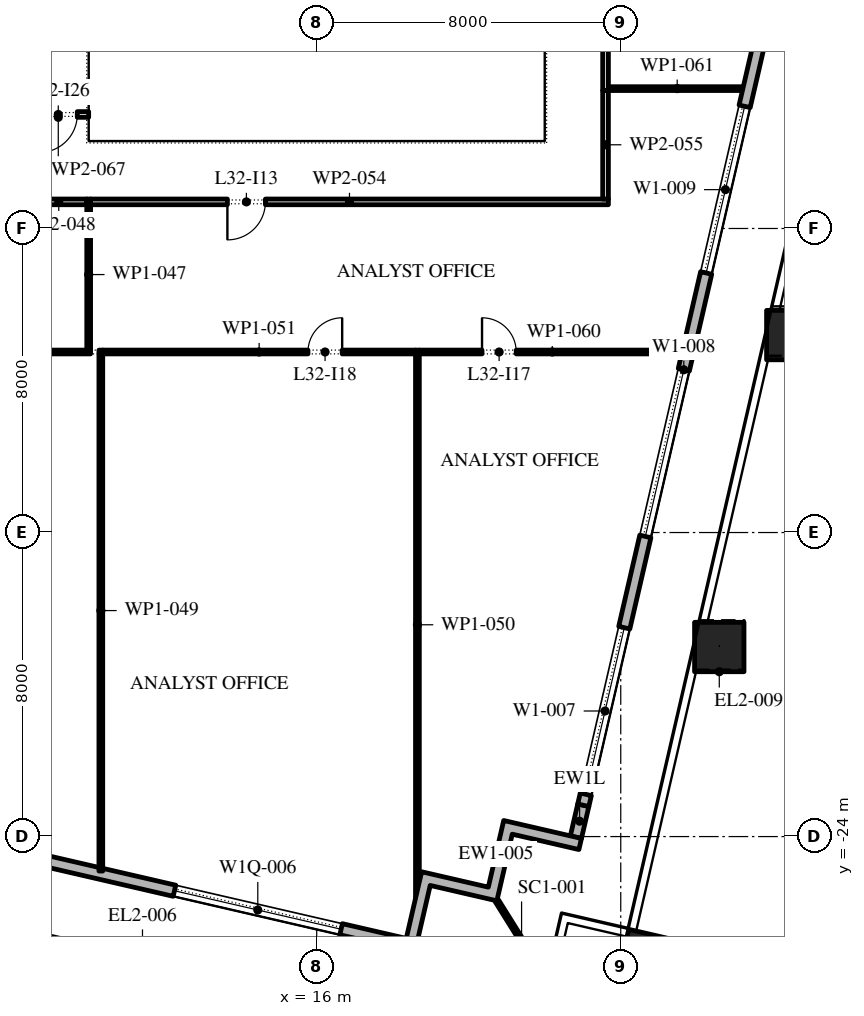
"""IFC4 building model, lengths in metres.
Left out: names, types, materials, properties, quantities, classifications, styles, units other than length and angle.
Written with IfcOpenShell. Run it as: python <this file> out.ifc"""

import sys

from ifc_helpers import new_model, si_unit, direction, frame, frame_2d, origin, origin_2d, place, context, subcontext, project, spatial, polyline, rectangle, outline, extrude, element, fill, save


model = new_model("IFC4")
c1 = context("Model", 3, precision=1e-05, world=origin(), true_north=direction((0.0, 1.0)))
c2 = subcontext(c1, "Body", "Model", "MODEL_VIEW")
j1 = project(units=[si_unit("LENGTHUNIT", "METRE"), si_unit("PLANEANGLEUNIT", "RADIAN")], contexts=[c1])
p1 = place(None, origin())
s1 = spatial("IfcSite", under=j1, at=p1, CompositionType="ELEMENT")
p2 = place(p1, origin())
s2 = spatial("IfcBuilding", under=s1, at=p2, CompositionType="ELEMENT")
p3 = place(p2, frame((0.0, 0.0, 147.6)))
s3 = spatial("IfcBuildingStorey", under=s2, at=p3, CompositionType="ELEMENT", Elevation=147.6)
p4 = place(p3, frame((24.698, -27.22, 0.0), z_axis=(0.0, 0.0, 1.0), x_axis=(0.974370064785, -0.224951054344, 0.0)))
e1 = element("IfcColumn", 1, at=p4, inside=s3, PredefinedType="COLUMN", context=c2, shape_type="SweptSolid", body=[
    extrude(rectangle(XDim=1.3, YDim=1.3, at=origin_2d()), origin(), (0.0, 0.0, 1.0), 4.2),
])
p5 = place(p3, frame((26.593, -19.012, 0.0), z_axis=(0.002906226325, 0.012613022249, 0.99991622925), x_axis=(-0.974466825284, 0.224531526563, 0.0)))
e2 = element("IfcColumn", 2, at=p5, inside=s3, PredefinedType="COLUMN", context=c2, shape_type="SweptSolid", body=[
    extrude(rectangle(XDim=1.3, YDim=1.3, at=origin_2d()), origin(), (0.0, 0.0, 1.0), 4.2),
])
p6 = place(p3, frame((28.487, -10.805, 0.0), z_axis=(0.005869091843, 0.025277771797, 0.999663237302), x_axis=(-0.974088391429, 0.226167649504, 0.0)))
e3 = element("IfcColumn", 3, at=p6, inside=s3, PredefinedType="COLUMN", context=c2, shape_type="SweptSolid", body=[
    extrude(rectangle(XDim=1.3, YDim=1.3, at=origin_2d()), origin(), (0.0, 0.0, 1.0), 4.201),
])
p7 = place(p3, frame((-31.078, -15.421, 0.0), z_axis=(0.0, 0.0, 1.0), x_axis=(0.974370456532, -0.224949357493, 0.0)))
e4 = element("IfcWall", 4, at=p7, inside=s3, PredefinedType="STANDARD", context=c2, shape_type="SweptSolid", body=[
    extrude(rectangle(XDim=51.0, YDim=0.3, at=frame_2d((25.5, 0.0))), origin(), (0.0, 0.0, 1.0), 4.0),
])
p8 = place(p7, frame((1.875, 0.0, 0.45)))
e5 = element("IfcOpeningElement", 5, at=p8, cuts=e4, PredefinedType="OPENING", context=c2, shape_type="SweptSolid", body=[
    extrude(rectangle(XDim=4.5, YDim=2.65, at=frame_2d((2.25, 1.325))), frame((0.0, 0.16, 0.0), z_axis=(0.0, -1.0, 0.0), x_axis=(1.0, 0.0, 0.0)), (0.0, 0.0, 1.0), 0.32),
])
p9 = place(p7, frame((10.275, 0.0, 0.45)))
e6 = element("IfcOpeningElement", 6, at=p9, cuts=e4, PredefinedType="OPENING", context=c2, shape_type="SweptSolid", body=[
    extrude(rectangle(XDim=4.5, YDim=2.525, at=frame_2d((2.25, 1.262))), frame((0.0, 0.16, 0.0), z_axis=(0.0, -1.0, 0.0), x_axis=(1.0, 0.0, 0.0)), (0.0, 0.0, 1.0), 0.32),
])
p10 = place(p7, frame((18.825, 0.0, 0.45)))
e7 = element("IfcOpeningElement", 7, at=p10, cuts=e4, PredefinedType="OPENING", context=c2, shape_type="SweptSolid", body=[
    extrude(rectangle(XDim=4.5, YDim=2.5, at=frame_2d((2.25, 1.25))), frame((0.0, 0.16, 0.0), z_axis=(0.0, -1.0, 0.0), x_axis=(1.0, 0.0, 0.0)), (0.0, 0.0, 1.0), 0.32),
])
p11 = place(p7, frame((27.075, 0.0, 0.0)))
e8 = element("IfcOpeningElement", 8, at=p11, cuts=e4, PredefinedType="OPENING", context=c2, shape_type="SweptSolid", body=[
    extrude(rectangle(XDim=2.4, YDim=3.5, at=frame_2d((1.2, 1.75))), frame((0.0, 0.16, 0.0), z_axis=(0.0, -1.0, 0.0), x_axis=(1.0, 0.0, 0.0)), (0.0, 0.0, 1.0), 0.32),
])
p12 = place(p7, frame((35.925, 0.0, 0.45)))
e9 = element("IfcOpeningElement", 9, at=p12, cuts=e4, PredefinedType="OPENING", context=c2, shape_type="SweptSolid", body=[
    extrude(rectangle(XDim=4.5, YDim=2.45, at=frame_2d((2.25, 1.225))), frame((0.0, 0.16, 0.0), z_axis=(0.0, -1.0, 0.0), x_axis=(1.0, 0.0, 0.0)), (0.0, 0.0, 1.0), 0.32),
])
p13 = place(p7, frame((44.475, 0.0, 0.45)))
e10 = element("IfcOpeningElement", 10, at=p13, cuts=e4, PredefinedType="OPENING", context=c2, shape_type="SweptSolid", body=[
    extrude(rectangle(XDim=4.5, YDim=2.45, at=frame_2d((2.25, 1.225))), frame((0.0, 0.16, 0.0), z_axis=(0.0, -1.0, 0.0), x_axis=(1.0, 0.0, 0.0)), (0.0, 0.0, 1.0), 0.32),
])
p14 = place(p3, frame((22.82, -24.016, 0.0), z_axis=(0.0, 0.0, 1.0), x_axis=(0.225107657095, 0.974333896935, 0.0)))
e11 = element("IfcWall", 11, at=p14, inside=s3, PredefinedType="STANDARD", context=c2, shape_type="SweptSolid", body=[
    extrude(rectangle(XDim=0.862, YDim=0.3, at=frame_2d((0.431, 0.0))), origin(), (0.0, 0.0, 1.0), 3.02),
])
p15 = place(p3, origin())
e12 = element("IfcWall", 12, at=p15, inside=s3, PredefinedType="STANDARD", context=c2, shape_type="SweptSolid", body=[
    extrude(outline(polyline([(20.515, -25.331), (20.92, -23.577), (22.967, -24.049), (22.899, -24.342), (21.145, -23.937), (20.74, -25.691), (18.986, -25.286), (18.649, -26.747), (18.357, -26.68), (18.762, -24.926), (20.515, -25.331)])), origin(), (0.0, 0.0, 1.0), 4.0),
])
p16 = place(p3, frame((20.74, -25.691, -0.05), z_axis=(0.0, 0.0, 1.0), x_axis=(0.529972121605, -0.848015064914, 0.0)))
e13 = element("IfcWall", 13, at=p16, inside=s3, PredefinedType="STANDARD", context=c2, shape_type="SweptSolid", body=[
    extrude(rectangle(XDim=2.455, YDim=0.1, at=frame_2d((1.228, 0.0))), origin(), (0.0, 0.0, 1.0), 4.05),
])
p17 = place(p3, frame((10.05, -11.25, 0.0), z_axis=(0.0, 0.0, 1.0), x_axis=(-1.0, 0.0, 0.0)))
e14 = element("IfcWall", 14, at=p17, inside=s3, PredefinedType="PARTITIONING", context=c2, shape_type="SweptSolid", body=[
    extrude(rectangle(XDim=11.99, YDim=0.1, at=frame_2d((5.995, 0.0))), origin(), (0.0, 0.0, 1.0), 4.0),
])
p18 = place(p17, frame((4.44, 0.0, 0.0)))
e15 = element("IfcOpeningElement", 15, at=p18, cuts=e14, PredefinedType="OPENING", context=c2, shape_type="SweptSolid", body=[
    extrude(rectangle(XDim=0.9, YDim=2.1, at=frame_2d((0.45, 1.05))), frame((0.0, 0.06, 0.0), z_axis=(0.0, -1.0, 0.0), x_axis=(1.0, 0.0, 0.0)), (0.0, 0.0, 1.0), 0.12),
])
p19 = place(p3, frame((10.0, -11.2, 0.0), z_axis=(0.0, 0.0, 1.0), x_axis=(0.0, 1.0, 0.0)))
e16 = element("IfcWall", 16, at=p19, inside=s3, PredefinedType="PARTITIONING", context=c2, shape_type="SweptSolid", body=[
    extrude(rectangle(XDim=3.975, YDim=0.1, at=frame_2d((1.987, 0.0))), origin(), (0.0, 0.0, 1.0), 4.0),
])
p20 = place(p3, frame((9.95, -7.3, 0.0), z_axis=(0.0, 0.0, 1.0), x_axis=(-1.0, 0.0, 0.0)))
e17 = element("IfcWall", 17, at=p20, inside=s3, PredefinedType="PARTITIONING", context=c2, shape_type="SweptSolid", body=[
    extrude(rectangle(XDim=1.475, YDim=0.15, at=frame_2d((0.737, 0.0))), origin(), (0.0, 0.0, 1.0), 4.0),
])
p21 = place(p3, frame((10.32, -24.907, 0.0), z_axis=(0.0, 0.0, 1.0), x_axis=(0.0, 1.0, 0.0)))
e18 = element("IfcWall", 18, at=p21, inside=s3, PredefinedType="PARTITIONING", context=c2, shape_type="SweptSolid", body=[
    extrude(rectangle(XDim=13.707, YDim=0.1, at=frame_2d((6.854, 0.0))), origin(), (0.0, 0.0, 1.0), 4.0),
])
p22 = place(p3, frame((18.65, -25.654, 0.0), z_axis=(0.0, 0.0, 1.0), x_axis=(0.0, 1.0, 0.0)))
e19 = element("IfcWall", 19, at=p22, inside=s3, PredefinedType="PARTITIONING", context=c2, shape_type="SweptSolid", body=[
    extrude(rectangle(XDim=14.454, YDim=0.1, at=frame_2d((7.227, 0.0))), origin(), (0.0, 0.0, 1.0), 4.0),
])
p23 = place(p3, frame((18.6, -11.25, 0.0), z_axis=(0.0, 0.0, 1.0), x_axis=(-1.0, 0.0, 0.0)))
e20 = element("IfcWall", 20, at=p23, inside=s3, PredefinedType="PARTITIONING", context=c2, shape_type="SweptSolid", body=[
    extrude(rectangle(XDim=8.23, YDim=0.1, at=frame_2d((4.115, 0.0))), origin(), (0.0, 0.0, 1.0), 4.0),
])
p24 = place(p23, frame((1.93, 0.0, 0.0)))
e21 = element("IfcOpeningElement", 21, at=p24, cuts=e20, PredefinedType="OPENING", context=c2, shape_type="SweptSolid", body=[
    extrude(rectangle(XDim=0.9, YDim=2.1, at=frame_2d((0.45, 1.05))), frame((0.0, 0.06, 0.0), z_axis=(0.0, -1.0, 0.0), x_axis=(1.0, 0.0, 0.0)), (0.0, 0.0, 1.0), 0.12),
])
p25 = place(p3, frame((23.675, -7.3, 0.0), z_axis=(0.0, 0.0, 1.0), x_axis=(-1.0, 0.0, 0.0)))
e22 = element("IfcWall", 22, at=p25, inside=s3, PredefinedType="PARTITIONING", context=c2, shape_type="SweptSolid", body=[
    extrude(rectangle(XDim=13.625, YDim=0.15, at=frame_2d((6.812, 0.0))), origin(), (0.0, 0.0, 1.0), 4.0),
])
p26 = place(p25, frame((9.025, 0.0, 0.0)))
e23 = element("IfcOpeningElement", 23, at=p26, cuts=e22, PredefinedType="OPENING", context=c2, shape_type="SweptSolid", body=[
    extrude(rectangle(XDim=1.0, YDim=2.1, at=frame_2d((0.5, 1.05))), frame((0.0, 0.085, 0.0), z_axis=(0.0, -1.0, 0.0), x_axis=(1.0, 0.0, 0.0)), (0.0, 0.0, 1.0), 0.17),
])
p27 = place(p3, frame((23.6, -4.37, 0.0), z_axis=(0.0, 0.0, 1.0), x_axis=(0.0, -1.0, 0.0)))
e24 = element("IfcWall", 24, at=p27, inside=s3, PredefinedType="PARTITIONING", context=c2, shape_type="SweptSolid", body=[
    extrude(rectangle(XDim=2.855, YDim=0.15, at=frame_2d((1.427, 0.0))), origin(), (0.0, 0.0, 1.0), 4.0),
])
p28 = place(p3, frame((23.6, 10.44, 0.0), z_axis=(0.0, 0.0, 1.0), x_axis=(0.0, -1.0, 0.0)))
e25 = element("IfcWall", 25, at=p28, inside=s3, PredefinedType="PARTITIONING", context=c2, shape_type="SweptSolid", body=[
    extrude(rectangle(XDim=14.81, YDim=0.15, at=frame_2d((7.405, 0.0))), origin(), (0.0, 0.0, 1.0), 4.0),
])
p29 = place(p28, frame((6.86, 0.0, 0.0)))
e26 = element("IfcOpeningElement", 26, at=p29, cuts=e25, PredefinedType="OPENING", context=c2, shape_type="SweptSolid", body=[
    extrude(rectangle(XDim=1.0, YDim=2.1, at=frame_2d((0.5, 1.05))), frame((0.0, 0.085, 0.0), z_axis=(0.0, -1.0, 0.0), x_axis=(1.0, 0.0, 0.0)), (0.0, 0.0, 1.0), 0.17),
])
p30 = place(p3, frame((25.696, -11.25, 0.0), z_axis=(0.0, 0.0, 1.0), x_axis=(-1.0, 0.0, 0.0)))
e27 = element("IfcWall", 27, at=p30, inside=s3, PredefinedType="PARTITIONING", context=c2, shape_type="SweptSolid", body=[
    extrude(rectangle(XDim=6.996, YDim=0.1, at=frame_2d((3.498, 0.0))), origin(), (0.0, 0.0, 1.0), 4.0),
])
p31 = place(p30, frame((4.446, 0.0, 0.0)))
e28 = element("IfcOpeningElement", 28, at=p31, cuts=e27, PredefinedType="OPENING", context=c2, shape_type="SweptSolid", body=[
    extrude(rectangle(XDim=0.9, YDim=2.1, at=frame_2d((0.45, 1.05))), frame((0.0, 0.06, 0.0), z_axis=(0.0, -1.0, 0.0), x_axis=(1.0, 0.0, 0.0)), (0.0, 0.0, 1.0), 0.12),
])
p32 = place(p3, frame((27.296, -4.32, 0.0), z_axis=(0.0, 0.0, 1.0), x_axis=(-1.0, 0.0, 0.0)))
e29 = element("IfcWall", 29, at=p32, inside=s3, PredefinedType="PARTITIONING", context=c2, shape_type="SweptSolid", body=[
    extrude(rectangle(XDim=3.621, YDim=0.1, at=frame_2d((1.811, 0.0))), origin(), (0.0, 0.0, 1.0), 4.0),
])
p33 = place(p3, frame((10.0, -5.0, 0.0), z_axis=(0.0, 0.0, 1.0), x_axis=(-1.0, 0.0, 0.0)))
e30 = element("IfcWall", 30, at=p33, inside=s3, PredefinedType="PARTITIONING", context=c2, shape_type="SweptSolid", body=[
    extrude(rectangle(XDim=1.6, YDim=0.15, at=frame_2d((0.8, 0.0))), origin(), (0.0, 0.0, 1.0), 4.0),
])
p34 = place(p33, frame((0.3, 0.0, 0.0)))
e31 = element("IfcOpeningElement", 31, at=p34, cuts=e30, PredefinedType="OPENING", context=c2, shape_type="SweptSolid", body=[
    extrude(rectangle(XDim=1.0, YDim=2.1, at=frame_2d((0.5, 1.05))), frame((0.0, 0.085, 0.0), z_axis=(0.0, -1.0, 0.0), x_axis=(1.0, 0.0, 0.0)), (0.0, 0.0, 1.0), 0.17),
])
p35 = place(p3, frame((23.014, -23.176, 0.0), z_axis=(0.0, 0.0, 1.0), x_axis=(0.2249511548, 0.974370041593, 0.0)))
e32 = element("IfcWall", 32, at=p35, inside=s3, PredefinedType="STANDARD", context=c2, shape_type="SweptSolid", body=[
    extrude(rectangle(XDim=48.638, YDim=0.3, at=frame_2d((24.319, 0.0))), origin(), (0.0, 0.0, 1.0), 4.0),
])
p36 = place(p35, frame((0.295, 0.0, 0.45)))
e33 = element("IfcOpeningElement", 33, at=p36, cuts=e32, PredefinedType="OPENING", context=c2, shape_type="SweptSolid", body=[
    extrude(rectangle(XDim=4.5, YDim=3.05, at=frame_2d((2.25, 1.525))), frame((0.0, 0.16, 0.0), z_axis=(0.0, -1.0, 0.0), x_axis=(1.0, 0.0, 0.0)), (0.0, 0.0, 1.0), 0.32),
])
p37 = place(p35, frame((7.259, 0.0, 0.45)))
e34 = element("IfcOpeningElement", 34, at=p37, cuts=e32, PredefinedType="OPENING", context=c2, shape_type="SweptSolid", body=[
    extrude(rectangle(XDim=4.5, YDim=3.05, at=frame_2d((2.25, 1.525))), frame((0.0, 0.16, 0.0), z_axis=(0.0, -1.0, 0.0), x_axis=(1.0, 0.0, 0.0)), (0.0, 0.0, 1.0), 0.32),
])
p38 = place(p35, frame((14.374, 0.0, 0.45)))
e35 = element("IfcOpeningElement", 35, at=p38, cuts=e32, PredefinedType="OPENING", context=c2, shape_type="SweptSolid", body=[
    extrude(rectangle(XDim=4.5, YDim=3.05, at=frame_2d((2.25, 1.525))), frame((0.0, 0.16, 0.0), z_axis=(0.0, -1.0, 0.0), x_axis=(1.0, 0.0, 0.0)), (0.0, 0.0, 1.0), 0.32),
])
p39 = place(p35, frame((22.538, 0.0, 0.0)))
e36 = element("IfcOpeningElement", 36, at=p39, cuts=e32, PredefinedType="OPENING", context=c2, shape_type="SweptSolid", body=[
    extrude(rectangle(XDim=2.4, YDim=3.5, at=frame_2d((1.2, 1.75))), frame((0.0, 0.16, 0.0), z_axis=(0.0, -1.0, 0.0), x_axis=(1.0, 0.0, 0.0)), (0.0, 0.0, 1.0), 0.32),
])
p40 = place(p35, frame((28.602, 0.0, 0.45)))
e37 = element("IfcOpeningElement", 37, at=p40, cuts=e32, PredefinedType="OPENING", context=c2, shape_type="SweptSolid", body=[
    extrude(rectangle(XDim=4.5, YDim=2.875, at=frame_2d((2.25, 1.438))), frame((0.0, 0.16, 0.0), z_axis=(0.0, -1.0, 0.0), x_axis=(1.0, 0.0, 0.0)), (0.0, 0.0, 1.0), 0.32),
])
p41 = place(p35, frame((35.716, 0.0, 0.45)))
e38 = element("IfcOpeningElement", 38, at=p41, cuts=e32, PredefinedType="OPENING", context=c2, shape_type="SweptSolid", body=[
    extrude(rectangle(XDim=4.5, YDim=2.825, at=frame_2d((2.25, 1.413))), frame((0.0, 0.16, 0.0), z_axis=(0.0, -1.0, 0.0), x_axis=(1.0, 0.0, 0.0)), (0.0, 0.0, 1.0), 0.32),
])
p42 = place(p35, frame((42.831, 0.0, 0.45)))
e39 = element("IfcOpeningElement", 39, at=p42, cuts=e32, PredefinedType="OPENING", context=c2, shape_type="SweptSolid", body=[
    extrude(rectangle(XDim=4.5, YDim=2.75, at=frame_2d((2.25, 1.375))), frame((0.0, 0.16, 0.0), z_axis=(0.0, -1.0, 0.0), x_axis=(1.0, 0.0, 0.0)), (0.0, 0.0, 1.0), 0.32),
])
p43 = place(p13, origin())
e40 = element("IfcWindow", 40, at=p43, inside=s3, PartitioningType="DOUBLE_PANEL_VERTICAL", PredefinedType="WINDOW", context=c2, shape_type="SweptSolid", body=[
    extrude(rectangle(XDim=4.5, YDim=2.45, at=frame_2d((2.25, 1.225))), frame((0.0, 0.03, 0.0), z_axis=(0.0, -1.0, 0.0), x_axis=(1.0, 0.0, 0.0)), (0.0, 0.0, 1.0), 0.06),
])
fill(e10, e40)
p44 = place(p36, origin())
e41 = element("IfcWindow", 41, at=p44, inside=s3, PartitioningType="DOUBLE_PANEL_VERTICAL", PredefinedType="WINDOW", context=c2, shape_type="SweptSolid", body=[
    extrude(rectangle(XDim=4.5, YDim=3.05, at=frame_2d((2.25, 1.525))), frame((0.0, 0.03, 0.0), z_axis=(0.0, -1.0, 0.0), x_axis=(1.0, 0.0, 0.0)), (0.0, 0.0, 1.0), 0.06),
])
fill(e33, e41)
p45 = place(p37, origin())
e42 = element("IfcWindow", 42, at=p45, inside=s3, PartitioningType="DOUBLE_PANEL_VERTICAL", PredefinedType="WINDOW", context=c2, shape_type="SweptSolid", body=[
    extrude(rectangle(XDim=4.5, YDim=3.05, at=frame_2d((2.25, 1.525))), frame((0.0, 0.03, 0.0), z_axis=(0.0, -1.0, 0.0), x_axis=(1.0, 0.0, 0.0)), (0.0, 0.0, 1.0), 0.06),
])
fill(e34, e42)
p46 = place(p38, origin())
e43 = element("IfcWindow", 43, at=p46, inside=s3, PartitioningType="DOUBLE_PANEL_VERTICAL", PredefinedType="WINDOW", context=c2, shape_type="SweptSolid", body=[
    extrude(rectangle(XDim=4.5, YDim=3.05, at=frame_2d((2.25, 1.525))), frame((0.0, 0.03, 0.0), z_axis=(0.0, -1.0, 0.0), x_axis=(1.0, 0.0, 0.0)), (0.0, 0.0, 1.0), 0.06),
])
fill(e35, e43)
p47 = place(p26, origin())
e44 = element("IfcDoor", 44, at=p47, inside=s3, OperationType="SINGLE_SWING_LEFT", PredefinedType="DOOR", context=c2, shape_type="SweptSolid", body=[
    extrude(rectangle(XDim=1.0, YDim=2.1, at=frame_2d((0.5, 1.05))), frame((0.0, 0.025, 0.0), z_axis=(0.0, -1.0, 0.0), x_axis=(1.0, 0.0, 0.0)), (0.0, 0.0, 1.0), 0.05),
])
fill(e23, e44)
p48 = place(p31, frame((0.9, 0.0, 0.0), z_axis=(0.0, 0.0, 1.0), x_axis=(-1.0, 0.0, 0.0)))
e45 = element("IfcDoor", 45, at=p48, inside=s3, OperationType="SINGLE_SWING_RIGHT", PredefinedType="DOOR", context=c2, shape_type="SweptSolid", body=[
    extrude(rectangle(XDim=0.9, YDim=2.1, at=frame_2d((0.45, 1.05))), frame((0.0, 0.025, 0.0), z_axis=(0.0, -1.0, 0.0), x_axis=(1.0, 0.0, 0.0)), (0.0, 0.0, 1.0), 0.05),
])
fill(e28, e45)
p49 = place(p24, frame((0.9, 0.0, 0.0), z_axis=(0.0, 0.0, 1.0), x_axis=(-1.0, 0.0, 0.0)))
e46 = element("IfcDoor", 46, at=p49, inside=s3, OperationType="SINGLE_SWING_LEFT", PredefinedType="DOOR", context=c2, shape_type="SweptSolid", body=[
    extrude(rectangle(XDim=0.9, YDim=2.1, at=frame_2d((0.45, 1.05))), frame((0.0, 0.025, 0.0), z_axis=(0.0, -1.0, 0.0), x_axis=(1.0, 0.0, 0.0)), (0.0, 0.0, 1.0), 0.05),
])
fill(e21, e46)
p50 = place(p34, origin())
e47 = element("IfcDoor", 47, at=p50, inside=s3, OperationType="SINGLE_SWING_LEFT", PredefinedType="DOOR", context=c2, shape_type="SweptSolid", body=[
    extrude(rectangle(XDim=1.0, YDim=2.1, at=frame_2d((0.5, 1.05))), frame((0.0, 0.025, 0.0), z_axis=(0.0, -1.0, 0.0), x_axis=(1.0, 0.0, 0.0)), (0.0, 0.0, 1.0), 0.05),
])
fill(e31, e47)
save(model, sys.argv[1])
